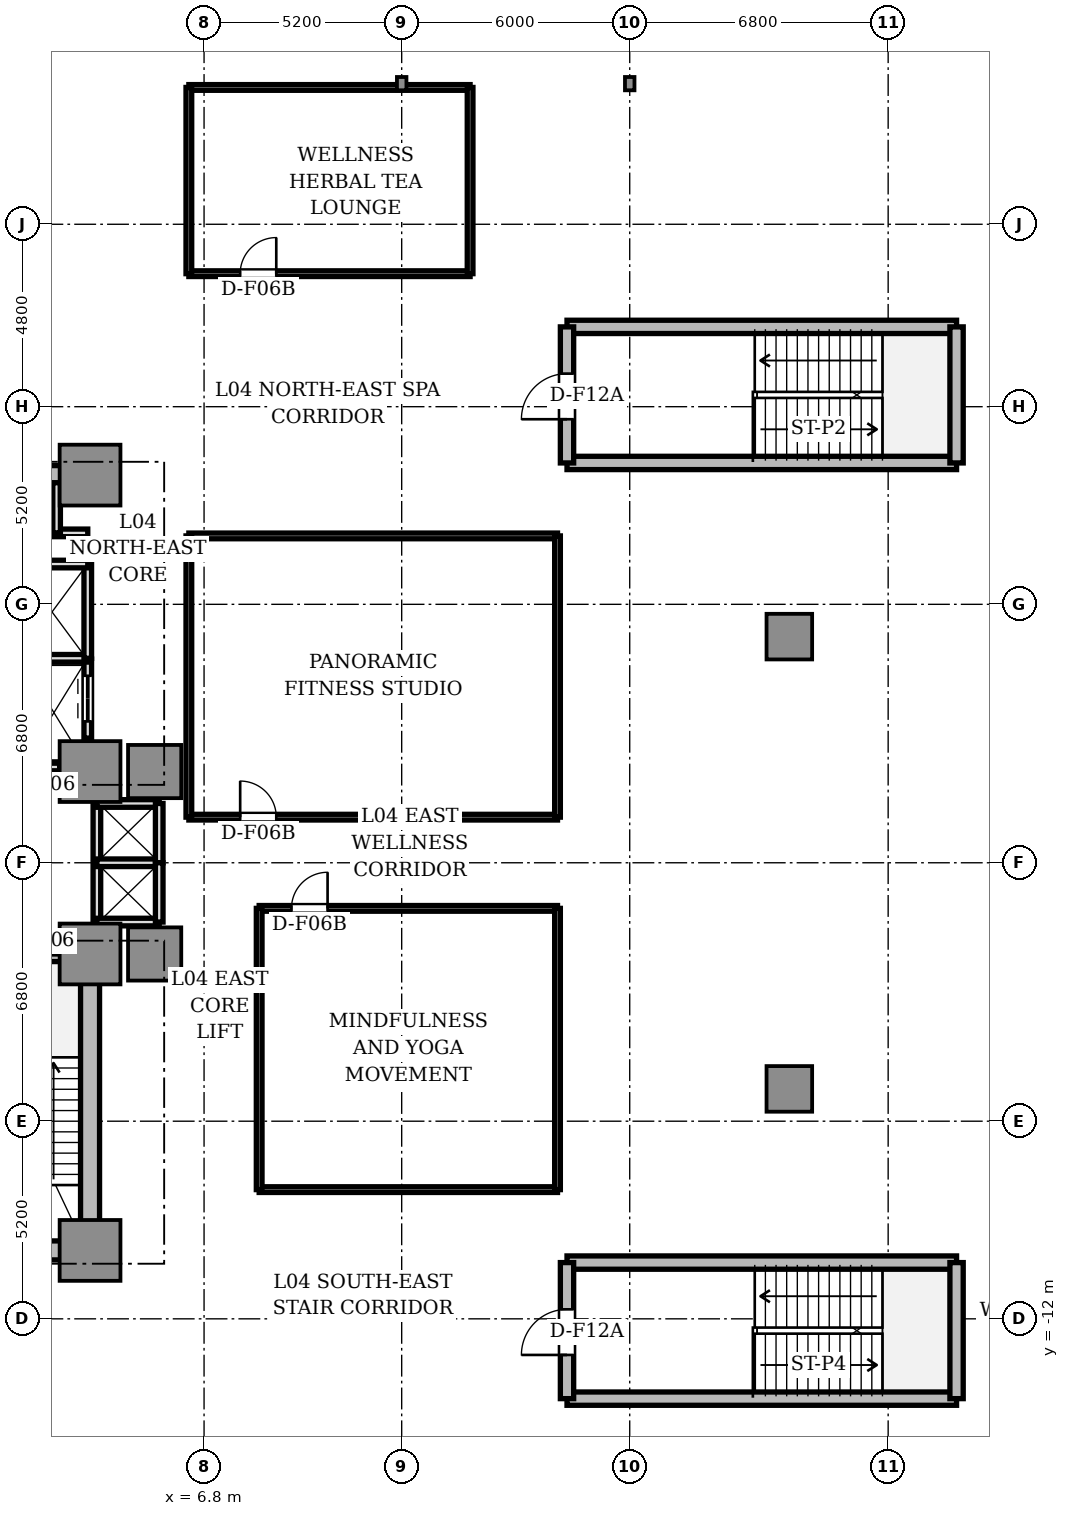
"""IFC4 building model, lengths in metres.
Left out: names, types, materials, properties, quantities, classifications, styles, units other than length and angle.
Written with IfcOpenShell. Run it as: python <this file> out.ifc"""

import sys

from ifc_helpers import new_model, si_unit, direction, frame, frame_2d, origin, origin_2d, place, context, subcontext, project, spatial, rectangle, i_section, extrude, source, transform, mapped, element, fill, save


model = new_model("IFC4")
c1 = context("Model", 3, precision=1e-05, world=origin(), true_north=direction((0.0, 1.0)))
c2 = subcontext(c1, "Body", "Model", "MODEL_VIEW")
j1 = project(units=[si_unit("LENGTHUNIT", "METRE"), si_unit("PLANEANGLEUNIT", "RADIAN")], contexts=[c1])
p1 = place(None, origin())
s1 = spatial("IfcSite", under=j1, at=p1, CompositionType="ELEMENT")
p2 = place(p1, origin())
s2 = spatial("IfcBuilding", under=s1, at=p2, CompositionType="ELEMENT")
p3 = place(p2, frame((0.0, 0.0, 18.6)))
s3 = spatial("IfcBuildingStorey", under=s2, at=p3, CompositionType="ELEMENT", Elevation=18.6)
for number, where, z_axis, x_axis in (
    (1, (-3.55, 10.2, 0.0), (0.0, 0.0, 1.0), (1.0, 0.0, 0.0)),
    (2, (-3.55, -10.2, 0.0), (0.0, 0.0, 1.0), (1.0, 0.0, 0.0)),
):
    element("IfcWall", number, at=place(p3, frame(where, z_axis=z_axis, x_axis=x_axis)), inside=s3, PredefinedType="SHEAR", context=c2, shape_type="SweptSolid", body=[
        extrude(rectangle(XDim=7.1, YDim=0.5, at=frame_2d((3.55, 0.0))), origin(), (0.0, 0.0, 1.0), 4.26),
    ])
p4 = place(p3, frame((3.8, -9.75, 0.0), z_axis=(0.0, 0.0, 1.0), x_axis=(0.0, 1.0, 0.0)))
e3 = element("IfcWall", 3, at=p4, inside=s3, PredefinedType="SHEAR", context=c2, shape_type="SweptSolid", body=[
    extrude(rectangle(XDim=6.9, YDim=0.5, at=frame_2d((3.45, 0.0))), origin(), (0.0, 0.0, 1.0), 4.26),
])
m1 = source(origin(), c2, "Body", "SweptSolid", [
    extrude(rectangle(XDim=1.6, YDim=1.6, at=origin_2d()), origin(), (0.0, 0.0, 1.0), 4.26),
])
for number, where, z_axis, x_axis in (
    (4, (3.8, 2.4, 0.0), (0.0, 0.0, 1.0), (1.0, 0.0, 0.0)),
    (5, (3.8, 10.2, 0.0), (0.0, 0.0, 1.0), (1.0, 0.0, 0.0)),
    (6, (3.8, -2.4, 0.0), (0.0, 0.0, 1.0), (1.0, 0.0, 0.0)),
    (7, (3.8, -10.2, 0.0), (0.0, 0.0, 1.0), (1.0, 0.0, 0.0)),
):
    element("IfcColumn", number, at=place(p3, frame(where, z_axis=z_axis, x_axis=x_axis)), inside=s3, PredefinedType="COLUMN", context=c2, shape_type="MappedRepresentation", body=[
        mapped(m1, transform((0.0, 0.0, 0.0), scale=1.0)),
    ])
m2 = source(origin(), c2, "Body", "SweptSolid", [
    extrude(rectangle(XDim=1.4, YDim=1.4, at=origin_2d()), origin(), (0.0, 0.0, 1.0), 4.26),
])
for number, where, z_axis, x_axis in (
    (8, (5.5, 2.4, 0.0), (0.0, 0.0, 1.0), (1.0, 0.0, 0.0)),
    (9, (5.5, -2.4, 0.0), (0.0, 0.0, 1.0), (1.0, 0.0, 0.0)),
):
    element("IfcColumn", number, at=place(p3, frame(where, z_axis=z_axis, x_axis=x_axis)), inside=s3, PredefinedType="COLUMN", context=c2, shape_type="MappedRepresentation", body=[
        mapped(m2, transform((0.0, 0.0, 0.0), scale=1.0)),
    ])
m3 = source(origin(), c2, "Body", "SweptSolid", [
    extrude(rectangle(XDim=1.2, YDim=1.2, at=origin_2d()), origin(), (0.0, 0.0, 1.0), 4.26),
])
for number, where, z_axis, x_axis in (
    (10, (22.2, -5.95, 0.0), (0.0, 0.0, 1.0), (1.0, 0.0, 0.0)),
    (11, (22.2, 5.95, 0.0), (0.0, 0.0, 1.0), (1.0, 0.0, 0.0)),
):
    element("IfcColumn", number, at=place(p3, frame(where, z_axis=z_axis, x_axis=x_axis)), inside=s3, PredefinedType="COLUMN", context=c2, shape_type="MappedRepresentation", body=[
        mapped(m3, transform((0.0, 0.0, 0.0), scale=1.0)),
    ])
m4 = source(origin(), c2, "Body", "SweptSolid", [
    extrude(i_section(OverallWidth=0.25, OverallDepth=0.35, WebThickness=0.012, FlangeThickness=0.012, FilletRadius=0.012, at=origin_2d()), origin(), (0.0, 0.0, 1.0), 4.26),
])
for number, where, z_axis, x_axis in (
    (12, (12.0, 20.5, 0.0), (0.0, 0.0, 1.0), (1.0, 0.0, 0.0)),
    (13, (18.0, 20.5, 0.0), (0.0, 0.0, 1.0), (1.0, 0.0, 0.0)),
):
    element("IfcColumn", number, at=place(p3, frame(where, z_axis=z_axis, x_axis=x_axis)), inside=s3, PredefinedType="COLUMN", context=c2, shape_type="MappedRepresentation", body=[
        mapped(m4, transform((0.0, 0.0, 0.0), scale=1.0)),
    ])
p5 = place(p3, frame((0.0, -2.5, 0.0), z_axis=(0.0, 0.0, 1.0), x_axis=(1.0, 0.0, 0.0)))
e14 = element("IfcWall", 14, at=p5, inside=s3, PredefinedType="SOLIDWALL", context=c2, shape_type="SweptSolid", body=[
    extrude(rectangle(XDim=3.72, YDim=0.2, at=frame_2d((1.86, 0.0))), origin(), (0.0, 0.0, 1.0), 4.26),
])
p6 = place(p3, frame((2.0, 2.52, 0.0), z_axis=(0.0, 0.0, 1.0), x_axis=(1.0, 0.0, 0.0)))
e15 = element("IfcWall", 15, at=p6, inside=s3, PredefinedType="SOLIDWALL", context=c2, shape_type="SweptSolid", body=[
    extrude(rectangle(XDim=1.0, YDim=0.2, at=frame_2d((0.5, 0.0))), origin(), (0.0, 0.0, 1.0), 3.81),
])
p7 = place(p3, frame((3.74, 3.28, 0.0), z_axis=(0.0, 0.0, 1.0), x_axis=(0.0, 1.0, 0.0)))
e16 = element("IfcWall", 16, at=p7, inside=s3, PredefinedType="SOLIDWALL", context=c2, shape_type="SweptSolid", body=[
    extrude(rectangle(XDim=2.08, YDim=0.2, at=frame_2d((1.04, 0.0))), origin(), (0.0, 0.0, 1.0), 3.81),
])
p8 = place(p7, frame((0.44, 0.0, 0.0)))
e17 = element("IfcOpeningElement", 17, at=p8, cuts=e16, PredefinedType="OPENING", context=c2, shape_type="SweptSolid", body=[
    extrude(rectangle(XDim=1.2, YDim=2.2, at=frame_2d((0.6, 1.1))), frame((0.0, 0.11, 0.0), z_axis=(0.0, -1.0, 0.0), x_axis=(1.0, 0.0, 0.0)), (0.0, 0.0, 1.0), 0.22),
])
p9 = place(p3, frame((0.05, 5.38, 0.0), z_axis=(0.0, 0.0, 1.0), x_axis=(1.0, 0.0, 0.0)))
e18 = element("IfcWall", 18, at=p9, inside=s3, PredefinedType="SOLIDWALL", context=c2, shape_type="SweptSolid", body=[
    extrude(rectangle(XDim=3.69, YDim=0.2, at=frame_2d((1.845, 0.0))), origin(), (0.0, 0.0, 1.0), 3.81),
])
p10 = place(p3, frame((3.74, 5.38, 0.0), z_axis=(0.0, 0.0, 1.0), x_axis=(0.0, 1.0, 0.0)))
e19 = element("IfcWall", 19, at=p10, inside=s3, PredefinedType="SOLIDWALL", context=c2, shape_type="SweptSolid", body=[
    extrude(rectangle(XDim=2.48, YDim=0.2, at=frame_2d((1.24, 0.0))), origin(), (0.0, 0.0, 1.0), 3.81),
])
p11 = place(p3, frame((1.9, 7.86, 0.0), z_axis=(0.0, 0.0, 1.0), x_axis=(1.0, 0.0, 0.0)))
e20 = element("IfcWall", 20, at=p11, inside=s3, PredefinedType="SOLIDWALL", context=c2, shape_type="SweptSolid", body=[
    extrude(rectangle(XDim=1.84, YDim=0.2, at=frame_2d((0.92, 0.0))), origin(), (0.0, 0.0, 1.0), 3.81),
])
p12 = place(p3, frame((3.98, -1.56, 0.0), z_axis=(0.0, 0.0, 1.0), x_axis=(0.0, 1.0, 0.0)))
e21 = element("IfcWall", 21, at=p12, inside=s3, PredefinedType="SOLIDWALL", context=c2, shape_type="SweptSolid", body=[
    extrude(rectangle(XDim=3.12, YDim=0.2, at=frame_2d((1.56, 0.0))), origin(), (0.0, 0.0, 1.0), 3.33),
])
for number, where, z_axis, x_axis in (
    (22, (3.98, 1.56, 0.0), (0.0, 0.0, 1.0), (1.0, 0.0, 0.0)),
    (23, (3.98, -1.56, 0.0), (0.0, 0.0, 1.0), (1.0, 0.0, 0.0)),
    (24, (3.98, 0.0, 0.0), (0.0, 0.0, 1.0), (1.0, 0.0, 0.0)),
):
    element("IfcWall", number, at=place(p3, frame(where, z_axis=z_axis, x_axis=x_axis)), inside=s3, PredefinedType="SOLIDWALL", context=c2, shape_type="SweptSolid", body=[
        extrude(rectangle(XDim=1.64, YDim=0.2, at=frame_2d((0.82, 0.0))), origin(), (0.0, 0.0, 1.0), 3.81),
    ])
for number, where, z_axis, x_axis in (
    (25, (5.62, 0.0, 0.0), (0.0, 0.0, 1.0), (0.0, 1.0, 0.0)),
    (26, (5.62, -1.56, 0.0), (0.0, 0.0, 1.0), (0.0, 1.0, 0.0)),
):
    element("IfcWall", number, at=place(p3, frame(where, z_axis=z_axis, x_axis=x_axis)), inside=s3, PredefinedType="SOLIDWALL", context=c2, shape_type="SweptSolid", body=[
        extrude(rectangle(XDim=1.56, YDim=0.2, at=frame_2d((0.78, 0.0))), origin(), (0.0, 0.0, 1.0), 3.81),
    ])
p13 = place(p3, frame((0.12, 8.68, 0.0), z_axis=(0.0, 0.0, 1.0), x_axis=(1.0, 0.0, 0.0)))
e27 = element("IfcWall", 27, at=p13, inside=s3, PredefinedType="SOLIDWALL", context=c2, shape_type="SweptSolid", body=[
    extrude(rectangle(XDim=3.62, YDim=0.2, at=frame_2d((1.81, 0.0))), origin(), (0.0, 0.0, 1.0), 3.81),
])
p14 = place(p13, frame((1.75, 0.0, 0.0)))
e28 = element("IfcOpeningElement", 28, at=p14, cuts=e27, PredefinedType="OPENING", context=c2, shape_type="SweptSolid", body=[
    extrude(rectangle(XDim=0.95, YDim=2.15, at=frame_2d((0.475, 1.075))), frame((0.0, 0.11, 0.0), z_axis=(0.0, -1.0, 0.0), x_axis=(1.0, 0.0, 0.0)), (0.0, 0.0, 1.0), 0.22),
])
p15 = place(p3, frame((2.92, 8.68, 0.0), z_axis=(0.0, 0.0, 1.0), x_axis=(0.0, 1.0, 0.0)))
e29 = element("IfcWall", 29, at=p15, inside=s3, PredefinedType="SOLIDWALL", context=c2, shape_type="SweptSolid", body=[
    extrude(rectangle(XDim=1.32, YDim=0.2, at=frame_2d((0.66, 0.0))), origin(), (0.0, 0.0, 1.0), 3.81),
])
for number, where, z_axis, x_axis in (
    (30, (16.35, 14.1, 0.0), (0.0, 0.0, 1.0), (1.0, 0.0, 0.0)),
    (31, (16.35, 10.52, 0.0), (0.0, 0.0, 1.0), (1.0, 0.0, 0.0)),
):
    element("IfcWall", number, at=place(p3, frame(where, z_axis=z_axis, x_axis=x_axis)), inside=s3, PredefinedType="SHEAR", context=c2, shape_type="SweptSolid", body=[
        extrude(rectangle(XDim=10.25, YDim=0.35, at=frame_2d((5.125, 0.0))), origin(), (0.0, 0.0, 1.0), 4.26),
    ])
p16 = place(p3, frame((16.35, 10.52, 0.0), z_axis=(0.0, 0.0, 1.0), x_axis=(0.0, 1.0, 0.0)))
e32 = element("IfcWall", 32, at=p16, inside=s3, PredefinedType="SHEAR", context=c2, shape_type="SweptSolid", body=[
    extrude(rectangle(XDim=3.58, YDim=0.35, at=frame_2d((1.79, 0.0))), origin(), (0.0, 0.0, 1.0), 4.26),
])
p17 = place(p16, frame((1.15, 0.0, 0.0)))
e33 = element("IfcOpeningElement", 33, at=p17, cuts=e32, PredefinedType="OPENING", context=c2, shape_type="SweptSolid", body=[
    extrude(rectangle(XDim=1.2, YDim=2.2, at=frame_2d((0.6, 1.1))), frame((0.0, 0.185, 0.0), z_axis=(0.0, -1.0, 0.0), x_axis=(1.0, 0.0, 0.0)), (0.0, 0.0, 1.0), 0.37),
])
p18 = place(p3, frame((26.6, 10.52, 0.0), z_axis=(0.0, 0.0, 1.0), x_axis=(0.0, 1.0, 0.0)))
e34 = element("IfcWall", 34, at=p18, inside=s3, PredefinedType="SHEAR", context=c2, shape_type="SweptSolid", body=[
    extrude(rectangle(XDim=3.58, YDim=0.35, at=frame_2d((1.79, 0.0))), origin(), (0.0, 0.0, 1.0), 4.26),
])
for number, where, z_axis, x_axis in (
    (35, (16.35, -10.52, 0.0), (0.0, 0.0, 1.0), (1.0, 0.0, 0.0)),
    (36, (16.35, -14.1, 0.0), (0.0, 0.0, 1.0), (1.0, 0.0, 0.0)),
):
    element("IfcWall", number, at=place(p3, frame(where, z_axis=z_axis, x_axis=x_axis)), inside=s3, PredefinedType="SHEAR", context=c2, shape_type="SweptSolid", body=[
        extrude(rectangle(XDim=10.25, YDim=0.35, at=frame_2d((5.125, 0.0))), origin(), (0.0, 0.0, 1.0), 4.26),
    ])
p19 = place(p3, frame((16.35, -14.1, 0.0), z_axis=(0.0, 0.0, 1.0), x_axis=(0.0, 1.0, 0.0)))
e37 = element("IfcWall", 37, at=p19, inside=s3, PredefinedType="SHEAR", context=c2, shape_type="SweptSolid", body=[
    extrude(rectangle(XDim=3.58, YDim=0.35, at=frame_2d((1.79, 0.0))), origin(), (0.0, 0.0, 1.0), 4.26),
])
p20 = place(p19, frame((1.15, 0.0, 0.0)))
e38 = element("IfcOpeningElement", 38, at=p20, cuts=e37, PredefinedType="OPENING", context=c2, shape_type="SweptSolid", body=[
    extrude(rectangle(XDim=1.2, YDim=2.2, at=frame_2d((0.6, 1.1))), frame((0.0, 0.185, 0.0), z_axis=(0.0, -1.0, 0.0), x_axis=(1.0, 0.0, 0.0)), (0.0, 0.0, 1.0), 0.37),
])
p21 = place(p3, frame((26.6, -14.1, 0.0), z_axis=(0.0, 0.0, 1.0), x_axis=(0.0, 1.0, 0.0)))
e39 = element("IfcWall", 39, at=p21, inside=s3, PredefinedType="SHEAR", context=c2, shape_type="SweptSolid", body=[
    extrude(rectangle(XDim=3.58, YDim=0.35, at=frame_2d((1.79, 0.0))), origin(), (0.0, 0.0, 1.0), 4.26),
])
p22 = place(p3, frame((6.4, 8.6, 0.0), z_axis=(0.0, 0.0, 1.0), x_axis=(1.0, 0.0, 0.0)))
e40 = element("IfcWall", 40, at=p22, inside=s3, PredefinedType="PARTITIONING", context=c2, shape_type="SweptSolid", body=[
    extrude(rectangle(XDim=9.7, YDim=0.15, at=frame_2d((4.85, 0.0))), origin(), (0.0, 0.0, 1.0), 3.81),
])
p23 = place(p3, frame((6.4, 1.2, 0.0), z_axis=(0.0, 0.0, 1.0), x_axis=(1.0, 0.0, 0.0)))
e41 = element("IfcWall", 41, at=p23, inside=s3, PredefinedType="PARTITIONING", context=c2, shape_type="SweptSolid", body=[
    extrude(rectangle(XDim=9.7, YDim=0.15, at=frame_2d((4.85, 0.0))), origin(), (0.0, 0.0, 1.0), 3.81),
])
p24 = place(p23, frame((1.35, 0.0, 0.0)))
e42 = element("IfcOpeningElement", 42, at=p24, cuts=e41, PredefinedType="OPENING", context=c2, shape_type="SweptSolid", body=[
    extrude(rectangle(XDim=0.95, YDim=2.15, at=frame_2d((0.475, 1.075))), frame((0.0, 0.085, 0.0), z_axis=(0.0, -1.0, 0.0), x_axis=(1.0, 0.0, 0.0)), (0.0, 0.0, 1.0), 0.17),
])
for number, where, z_axis, x_axis in (
    (43, (6.4, 1.2, 0.0), (0.0, 0.0, 1.0), (0.0, 1.0, 0.0)),
    (44, (16.1, 1.2, 0.0), (0.0, 0.0, 1.0), (0.0, 1.0, 0.0)),
):
    element("IfcWall", number, at=place(p3, frame(where, z_axis=z_axis, x_axis=x_axis)), inside=s3, PredefinedType="PARTITIONING", context=c2, shape_type="SweptSolid", body=[
        extrude(rectangle(XDim=7.4, YDim=0.15, at=frame_2d((3.7, 0.0))), origin(), (0.0, 0.0, 1.0), 3.81),
    ])
p25 = place(p3, frame((6.4, 20.4, 0.0), z_axis=(0.0, 0.0, 1.0), x_axis=(1.0, 0.0, 0.0)))
e45 = element("IfcWall", 45, at=p25, inside=s3, PredefinedType="PARTITIONING", context=c2, shape_type="SweptSolid", body=[
    extrude(rectangle(XDim=7.4, YDim=0.15, at=frame_2d((3.7, 0.0))), origin(), (0.0, 0.0, 1.0), 3.67),
])
p26 = place(p3, frame((6.4, 15.5, 0.0), z_axis=(0.0, 0.0, 1.0), x_axis=(1.0, 0.0, 0.0)))
e46 = element("IfcWall", 46, at=p26, inside=s3, PredefinedType="PARTITIONING", context=c2, shape_type="SweptSolid", body=[
    extrude(rectangle(XDim=7.4, YDim=0.15, at=frame_2d((3.7, 0.0))), origin(), (0.0, 0.0, 1.0), 3.81),
])
p27 = place(p26, frame((1.35, 0.0, 0.0)))
e47 = element("IfcOpeningElement", 47, at=p27, cuts=e46, PredefinedType="OPENING", context=c2, shape_type="SweptSolid", body=[
    extrude(rectangle(XDim=0.95, YDim=2.15, at=frame_2d((0.475, 1.075))), frame((0.0, 0.085, 0.0), z_axis=(0.0, -1.0, 0.0), x_axis=(1.0, 0.0, 0.0)), (0.0, 0.0, 1.0), 0.17),
])
for number, where, z_axis, x_axis in (
    (48, (6.4, 15.5, 0.0), (0.0, 0.0, 1.0), (0.0, 1.0, 0.0)),
    (49, (13.8, 15.5, 0.0), (0.0, 0.0, 1.0), (0.0, 1.0, 0.0)),
):
    element("IfcWall", number, at=place(p3, frame(where, z_axis=z_axis, x_axis=x_axis)), inside=s3, PredefinedType="PARTITIONING", context=c2, shape_type="SweptSolid", body=[
        extrude(rectangle(XDim=4.9, YDim=0.15, at=frame_2d((2.45, 0.0))), origin(), (0.0, 0.0, 1.0), 3.81),
    ])
p28 = place(p3, frame((8.25, -1.2, 0.0), z_axis=(0.0, 0.0, 1.0), x_axis=(1.0, 0.0, 0.0)))
e50 = element("IfcWall", 50, at=p28, inside=s3, PredefinedType="PARTITIONING", context=c2, shape_type="SweptSolid", body=[
    extrude(rectangle(XDim=7.85, YDim=0.15, at=frame_2d((3.925, 0.0))), origin(), (0.0, 0.0, 1.0), 3.81),
])
p29 = place(p28, frame((0.85, 0.0, 0.0)))
e51 = element("IfcOpeningElement", 51, at=p29, cuts=e50, PredefinedType="OPENING", context=c2, shape_type="SweptSolid", body=[
    extrude(rectangle(XDim=0.95, YDim=2.15, at=frame_2d((0.475, 1.075))), frame((0.0, 0.085, 0.0), z_axis=(0.0, -1.0, 0.0), x_axis=(1.0, 0.0, 0.0)), (0.0, 0.0, 1.0), 0.17),
])
p30 = place(p3, frame((8.25, -8.6, 0.0), z_axis=(0.0, 0.0, 1.0), x_axis=(1.0, 0.0, 0.0)))
e52 = element("IfcWall", 52, at=p30, inside=s3, PredefinedType="PARTITIONING", context=c2, shape_type="SweptSolid", body=[
    extrude(rectangle(XDim=7.85, YDim=0.15, at=frame_2d((3.925, 0.0))), origin(), (0.0, 0.0, 1.0), 3.81),
])
for number, where, z_axis, x_axis in (
    (53, (8.25, -8.6, 0.0), (0.0, 0.0, 1.0), (0.0, 1.0, 0.0)),
    (54, (16.1, -8.6, 0.0), (0.0, 0.0, 1.0), (0.0, 1.0, 0.0)),
):
    element("IfcWall", number, at=place(p3, frame(where, z_axis=z_axis, x_axis=x_axis)), inside=s3, PredefinedType="PARTITIONING", context=c2, shape_type="SweptSolid", body=[
        extrude(rectangle(XDim=7.4, YDim=0.15, at=frame_2d((3.7, 0.0))), origin(), (0.0, 0.0, 1.0), 3.81),
    ])
m5 = source(origin(), c2, "Body", "SweptSolid", [
    extrude(rectangle(XDim=1.2, YDim=0.05, at=origin_2d()), origin(), (0.0, 0.0, 1.0), 2.2),
])
p31 = place(p8, frame((0.6, 0.0, 0.0)))
e55 = element("IfcDoor", 55, at=p31, inside=s3, OperationType="DOUBLE_DOOR_SLIDING", PredefinedType="DOOR", context=c2, shape_type="MappedRepresentation", body=[
    mapped(m5, transform((0.0, 0.0, 0.0), scale=1.0)),
])
fill(e17, e55)
m6 = source(origin(), c2, "Body", "SweptSolid", [
    extrude(rectangle(XDim=0.95, YDim=0.05, at=origin_2d()), origin(), (0.0, 0.0, 1.0), 2.15),
])
p32 = place(p14, frame((0.475, 0.0, 0.0)))
e56 = element("IfcDoor", 56, at=p32, inside=s3, OperationType="SINGLE_SWING_LEFT", PredefinedType="DOOR", context=c2, shape_type="MappedRepresentation", body=[
    mapped(m6, transform((0.0, 0.0, 0.0), scale=1.0)),
])
fill(e28, e56)
p33 = place(p17, frame((0.6, 0.0, 0.0)))
e57 = element("IfcDoor", 57, at=p33, inside=s3, OperationType="SINGLE_SWING_LEFT", PredefinedType="DOOR", context=c2, shape_type="MappedRepresentation", body=[
    mapped(m5, transform((0.0, 0.0, 0.0), scale=1.0)),
])
fill(e33, e57)
p34 = place(p20, frame((0.6, 0.0, 0.0)))
e58 = element("IfcDoor", 58, at=p34, inside=s3, OperationType="SINGLE_SWING_LEFT", PredefinedType="DOOR", context=c2, shape_type="MappedRepresentation", body=[
    mapped(m5, transform((0.0, 0.0, 0.0), scale=1.0)),
])
fill(e38, e58)
p35 = place(p24, frame((0.475, 0.0, 0.0)))
e59 = element("IfcDoor", 59, at=p35, inside=s3, OperationType="SINGLE_SWING_LEFT", PredefinedType="DOOR", context=c2, shape_type="MappedRepresentation", body=[
    mapped(m6, transform((0.0, 0.0, 0.0), scale=1.0)),
])
fill(e42, e59)
p36 = place(p27, frame((0.475, 0.0, 0.0)))
e60 = element("IfcDoor", 60, at=p36, inside=s3, OperationType="SINGLE_SWING_RIGHT", PredefinedType="DOOR", context=c2, shape_type="MappedRepresentation", body=[
    mapped(m6, transform((0.0, 0.0, 0.0), scale=1.0)),
])
fill(e47, e60)
p37 = place(p29, frame((0.475, 0.0, 0.0)))
e61 = element("IfcDoor", 61, at=p37, inside=s3, OperationType="SINGLE_SWING_RIGHT", PredefinedType="DOOR", context=c2, shape_type="MappedRepresentation", body=[
    mapped(m6, transform((0.0, 0.0, 0.0), scale=1.0)),
])
fill(e51, e61)
save(model, sys.argv[1])
